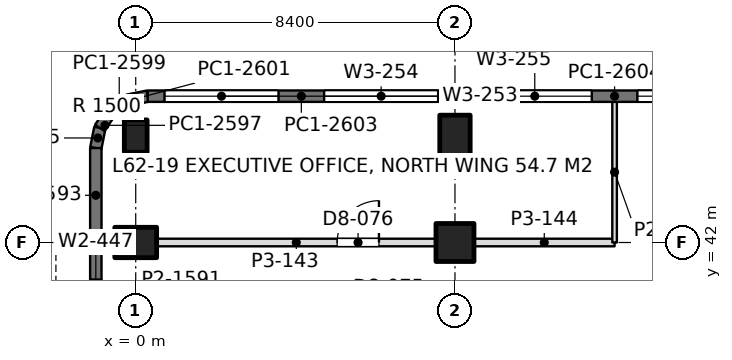
"""IFC4 building model, lengths in metres.
Left out: names, types, materials, properties, quantities, classifications, styles, units other than length and angle.
Written with IfcOpenShell. Run it as: python <this file> out.ifc"""

import sys

from ifc_helpers import new_model, si_unit, direction, frame, frame_2d, origin, origin_2d, place, context, subcontext, project, spatial, rectangle, extrude, element, fill, save


model = new_model("IFC4")
c1 = context("Model", 3, precision=1e-05, world=origin(), true_north=direction((0.0, 1.0)))
c2 = subcontext(c1, "Body", "Model", "MODEL_VIEW")
j1 = project(units=[si_unit("LENGTHUNIT", "METRE"), si_unit("PLANEANGLEUNIT", "RADIAN")], contexts=[c1])
p1 = place(None, origin())
s1 = spatial("IfcSite", under=j1, at=p1, CompositionType="ELEMENT")
p2 = place(p1, origin())
s2 = spatial("IfcBuilding", under=s1, at=p2, CompositionType="ELEMENT")
p3 = place(p2, frame((0.0, 0.0, 272.7)))
s3 = spatial("IfcBuildingStorey", under=s2, at=p3, CompositionType="ELEMENT", Elevation=272.7)
p4 = place(p3, frame((0.0, 42.0, 0.0), z_axis=(0.0, 0.0, 1.0), x_axis=(0.0, 1.0, 0.0)))
e1 = element("IfcColumn", 1, at=p4, inside=s3, PredefinedType="COLUMN", context=c2, shape_type="SweptSolid", body=[
    extrude(rectangle(XDim=0.8, YDim=1.1, at=origin_2d()), origin(), (0.0, 0.0, 1.0), 4.5),
])
p5 = place(p3, frame((0.0, 44.8, 0.0), z_axis=(0.0, 0.0, 1.0), x_axis=(1.0, 0.0, 0.0)))
e2 = element("IfcColumn", 2, at=p5, inside=s3, PredefinedType="COLUMN", context=c2, shape_type="SweptSolid", body=[
    extrude(rectangle(XDim=0.6, YDim=0.85, at=origin_2d()), origin(), (0.0, 0.0, 1.0), 4.5),
])
p6 = place(p3, frame((8.4, 42.0, 0.0), z_axis=(0.0, 0.0, 1.0), x_axis=(1.0, 0.0, 0.0)))
e3 = element("IfcColumn", 3, at=p6, inside=s3, PredefinedType="COLUMN", context=c2, shape_type="SweptSolid", body=[
    extrude(rectangle(XDim=1.0, YDim=1.0, at=origin_2d()), origin(), (0.0, 0.0, 1.0), 4.5),
])
p7 = place(p3, frame((8.4, 44.8, 0.0), z_axis=(0.0, 0.0, 1.0), x_axis=(1.0, 0.0, 0.0)))
e4 = element("IfcColumn", 4, at=p7, inside=s3, PredefinedType="COLUMN", context=c2, shape_type="SweptSolid", body=[
    extrude(rectangle(XDim=0.8, YDim=1.1, at=origin_2d()), origin(), (0.0, 0.0, 1.0), 4.5),
])
p8 = place(p3, frame((-1.05, 37.65, 0.0), z_axis=(0.0, 0.0, 1.0), x_axis=(0.0, 1.0, 0.0)))
e5 = element("IfcWall", 5, at=p8, inside=s3, PredefinedType="SOLIDWALL", context=c2, shape_type="SweptSolid", body=[
    extrude(rectangle(XDim=4.35, YDim=0.3, at=frame_2d((2.175, 0.0))), origin(), (0.0, 0.0, 1.0), 4.35),
])
p9 = place(p8, frame((0.975, 0.0, 0.9)))
e6 = element("IfcOpeningElement", 6, at=p9, cuts=e5, PredefinedType="OPENING", context=c2, shape_type="SweptSolid", body=[
    extrude(rectangle(XDim=2.4, YDim=1.9, at=frame_2d((1.2, 0.95))), frame((0.0, 0.16, 0.0), z_axis=(0.0, -1.0, 0.0), x_axis=(1.0, 0.0, 0.0)), (0.0, 0.0, 1.0), 0.32),
])
p10 = place(p3, frame((-1.05, 42.0, 0.0), z_axis=(0.0, 0.0, 1.0), x_axis=(0.0, 1.0, 0.0)))
e7 = element("IfcWall", 7, at=p10, inside=s3, PredefinedType="SOLIDWALL", context=c2, shape_type="SweptSolid", body=[
    extrude(rectangle(XDim=2.485, YDim=0.3, at=frame_2d((1.243, 0.0))), origin(), (0.0, 0.0, 1.0), 4.35),
])
p11 = place(p3, frame((-1.05, 44.485, 0.0), z_axis=(0.0, 0.0, 1.0), x_axis=(0.195073962632, 0.980788534345, 0.0)))
e8 = element("IfcWall", 8, at=p11, inside=s3, PredefinedType="SOLIDWALL", context=c2, shape_type="SweptSolid", body=[
    extrude(rectangle(XDim=0.541, YDim=0.3, at=frame_2d((0.271, 0.0))), origin(), (0.0, 0.0, 1.0), 4.35),
])
p12 = place(p3, frame((-0.945, 45.015, 0.0), z_axis=(0.0, 0.0, 1.0), x_axis=(0.55534295404, 0.831621430339, 0.0)))
e9 = element("IfcWall", 9, at=p12, inside=s3, PredefinedType="SOLIDWALL", context=c2, shape_type="SweptSolid", body=[
    extrude(rectangle(XDim=0.526, YDim=0.3, at=frame_2d((0.263, 0.0))), origin(), (0.0, 0.0, 1.0), 4.35),
])
p13 = place(p3, frame((-0.653, 45.453, 0.0), z_axis=(0.0, 0.0, 1.0), x_axis=(0.831692711774, 0.555236195849, 0.0)))
e10 = element("IfcWall", 10, at=p13, inside=s3, PredefinedType="SOLIDWALL", context=c2, shape_type="SweptSolid", body=[
    extrude(rectangle(XDim=0.525, YDim=0.3, at=frame_2d((0.263, 0.0))), origin(), (0.0, 0.0, 1.0), 4.35),
])
p14 = place(p3, frame((-0.216, 45.744, 0.0), z_axis=(0.0, 0.0, 1.0), x_axis=(0.980702050465, 0.1955082817, 0.0)))
e11 = element("IfcWall", 11, at=p14, inside=s3, PredefinedType="SOLIDWALL", context=c2, shape_type="SweptSolid", body=[
    extrude(rectangle(XDim=0.541, YDim=0.3, at=frame_2d((0.271, 0.0))), origin(), (0.0, 0.0, 1.0), 4.35),
])
p15 = place(p3, frame((0.315, 45.85, 0.0), z_axis=(0.0, 0.0, 1.0), x_axis=(1.0, 0.0, 0.0)))
e12 = element("IfcWall", 12, at=p15, inside=s3, PredefinedType="SOLIDWALL", context=c2, shape_type="SweptSolid", body=[
    extrude(rectangle(XDim=8.085, YDim=0.3, at=frame_2d((4.042, 0.0))), origin(), (0.0, 0.0, 1.0), 4.35),
])
p16 = place(p15, frame((0.443, 0.0, 0.9)))
e13 = element("IfcOpeningElement", 13, at=p16, cuts=e12, PredefinedType="OPENING", context=c2, shape_type="SweptSolid", body=[
    extrude(rectangle(XDim=3.0, YDim=2.4, at=frame_2d((1.5, 1.2))), frame((0.0, 0.16, 0.0), z_axis=(0.0, -1.0, 0.0), x_axis=(1.0, 0.0, 0.0)), (0.0, 0.0, 1.0), 0.32),
])
p17 = place(p15, frame((4.643, 0.0, 0.9)))
e14 = element("IfcOpeningElement", 14, at=p17, cuts=e12, PredefinedType="OPENING", context=c2, shape_type="SweptSolid", body=[
    extrude(rectangle(XDim=3.0, YDim=2.4, at=frame_2d((1.5, 1.2))), frame((0.0, 0.16, 0.0), z_axis=(0.0, -1.0, 0.0), x_axis=(1.0, 0.0, 0.0)), (0.0, 0.0, 1.0), 0.32),
])
p18 = place(p3, frame((8.4, 45.85, 0.0), z_axis=(0.0, 0.0, 1.0), x_axis=(1.0, 0.0, 0.0)))
e15 = element("IfcWall", 15, at=p18, inside=s3, PredefinedType="SOLIDWALL", context=c2, shape_type="SweptSolid", body=[
    extrude(rectangle(XDim=8.4, YDim=0.3, at=frame_2d((4.2, 0.0))), origin(), (0.0, 0.0, 1.0), 4.35),
])
p19 = place(p18, frame((0.6, 0.0, 0.9)))
e16 = element("IfcOpeningElement", 16, at=p19, cuts=e15, PredefinedType="OPENING", context=c2, shape_type="SweptSolid", body=[
    extrude(rectangle(XDim=3.0, YDim=2.4, at=frame_2d((1.5, 1.2))), frame((0.0, 0.16, 0.0), z_axis=(0.0, -1.0, 0.0), x_axis=(1.0, 0.0, 0.0)), (0.0, 0.0, 1.0), 0.32),
])
p20 = place(p18, frame((4.8, 0.0, 0.9)))
e17 = element("IfcOpeningElement", 17, at=p20, cuts=e15, PredefinedType="OPENING", context=c2, shape_type="SweptSolid", body=[
    extrude(rectangle(XDim=3.0, YDim=2.4, at=frame_2d((1.5, 1.2))), frame((0.0, 0.16, 0.0), z_axis=(0.0, -1.0, 0.0), x_axis=(1.0, 0.0, 0.0)), (0.0, 0.0, 1.0), 0.32),
])
p21 = place(p3, frame((0.549, 42.0, 0.0), z_axis=(0.0, 0.0, 1.0), x_axis=(1.0, 0.0, 0.0)))
e18 = element("IfcWall", 18, at=p21, inside=s3, PredefinedType="PARTITIONING", context=c2, shape_type="SweptSolid", body=[
    extrude(rectangle(XDim=7.352, YDim=0.2, at=frame_2d((3.676, 0.0))), origin(), (0.0, 0.0, 1.0), 3.8),
])
p22 = place(p21, frame((4.751, 0.0, 0.0)))
e19 = element("IfcOpeningElement", 19, at=p22, cuts=e18, PredefinedType="OPENING", context=c2, shape_type="SweptSolid", body=[
    extrude(rectangle(XDim=1.1, YDim=2.4, at=frame_2d((0.55, 1.2))), frame((0.0, 0.11, 0.0), z_axis=(0.0, -1.0, 0.0), x_axis=(1.0, 0.0, 0.0)), (0.0, 0.0, 1.0), 0.22),
])
p23 = place(p3, frame((8.899, 42.0, 0.0), z_axis=(0.0, 0.0, 1.0), x_axis=(1.0, 0.0, 0.0)))
e20 = element("IfcWall", 20, at=p23, inside=s3, PredefinedType="PARTITIONING", context=c2, shape_type="SweptSolid", body=[
    extrude(rectangle(XDim=3.701, YDim=0.2, at=frame_2d((1.851, 0.0))), origin(), (0.0, 0.0, 1.0), 3.8),
])
p24 = place(p3, frame((12.6, 42.0, 0.0), z_axis=(0.0, 0.0, 1.0), x_axis=(0.0, 1.0, 0.0)))
e21 = element("IfcWall", 21, at=p24, inside=s3, PredefinedType="PARTITIONING", context=c2, shape_type="SweptSolid", body=[
    extrude(rectangle(XDim=3.702, YDim=0.12, at=frame_2d((1.851, 0.0))), origin(), (0.0, 0.0, 1.0), 3.8),
])
p25 = place(p9, origin())
e22 = element("IfcWindow", 22, at=p25, inside=s3, PartitioningType="SINGLE_PANEL", PredefinedType="WINDOW", context=c2, shape_type="SweptSolid", body=[
    extrude(rectangle(XDim=2.4, YDim=1.9, at=frame_2d((1.2, 0.95))), frame((0.0, 0.03, 0.0), z_axis=(0.0, -1.0, 0.0), x_axis=(1.0, 0.0, 0.0)), (0.0, 0.0, 1.0), 0.06),
])
fill(e6, e22)
p26 = place(p16, origin())
e23 = element("IfcWindow", 23, at=p26, inside=s3, PartitioningType="SINGLE_PANEL", PredefinedType="WINDOW", context=c2, shape_type="SweptSolid", body=[
    extrude(rectangle(XDim=3.0, YDim=2.4, at=frame_2d((1.5, 1.2))), frame((0.0, 0.03, 0.0), z_axis=(0.0, -1.0, 0.0), x_axis=(1.0, 0.0, 0.0)), (0.0, 0.0, 1.0), 0.06),
])
fill(e13, e23)
p27 = place(p17, origin())
e24 = element("IfcWindow", 24, at=p27, inside=s3, PartitioningType="SINGLE_PANEL", PredefinedType="WINDOW", context=c2, shape_type="SweptSolid", body=[
    extrude(rectangle(XDim=3.0, YDim=2.4, at=frame_2d((1.5, 1.2))), frame((0.0, 0.03, 0.0), z_axis=(0.0, -1.0, 0.0), x_axis=(1.0, 0.0, 0.0)), (0.0, 0.0, 1.0), 0.06),
])
fill(e14, e24)
p28 = place(p19, origin())
e25 = element("IfcWindow", 25, at=p28, inside=s3, PartitioningType="SINGLE_PANEL", PredefinedType="WINDOW", context=c2, shape_type="SweptSolid", body=[
    extrude(rectangle(XDim=3.0, YDim=2.4, at=frame_2d((1.5, 1.2))), frame((0.0, 0.03, 0.0), z_axis=(0.0, -1.0, 0.0), x_axis=(1.0, 0.0, 0.0)), (0.0, 0.0, 1.0), 0.06),
])
fill(e16, e25)
p29 = place(p20, origin())
e26 = element("IfcWindow", 26, at=p29, inside=s3, PartitioningType="SINGLE_PANEL", PredefinedType="WINDOW", context=c2, shape_type="SweptSolid", body=[
    extrude(rectangle(XDim=3.0, YDim=2.4, at=frame_2d((1.5, 1.2))), frame((0.0, 0.03, 0.0), z_axis=(0.0, -1.0, 0.0), x_axis=(1.0, 0.0, 0.0)), (0.0, 0.0, 1.0), 0.06),
])
fill(e17, e26)
p30 = place(p22, origin())
e27 = element("IfcDoor", 27, at=p30, inside=s3, OperationType="SINGLE_SWING_RIGHT", PredefinedType="DOOR", context=c2, shape_type="SweptSolid", body=[
    extrude(rectangle(XDim=1.1, YDim=2.4, at=frame_2d((0.55, 1.2))), frame((0.0, 0.025, 0.0), z_axis=(0.0, -1.0, 0.0), x_axis=(1.0, 0.0, 0.0)), (0.0, 0.0, 1.0), 0.05),
])
fill(e19, e27)
save(model, sys.argv[1])
